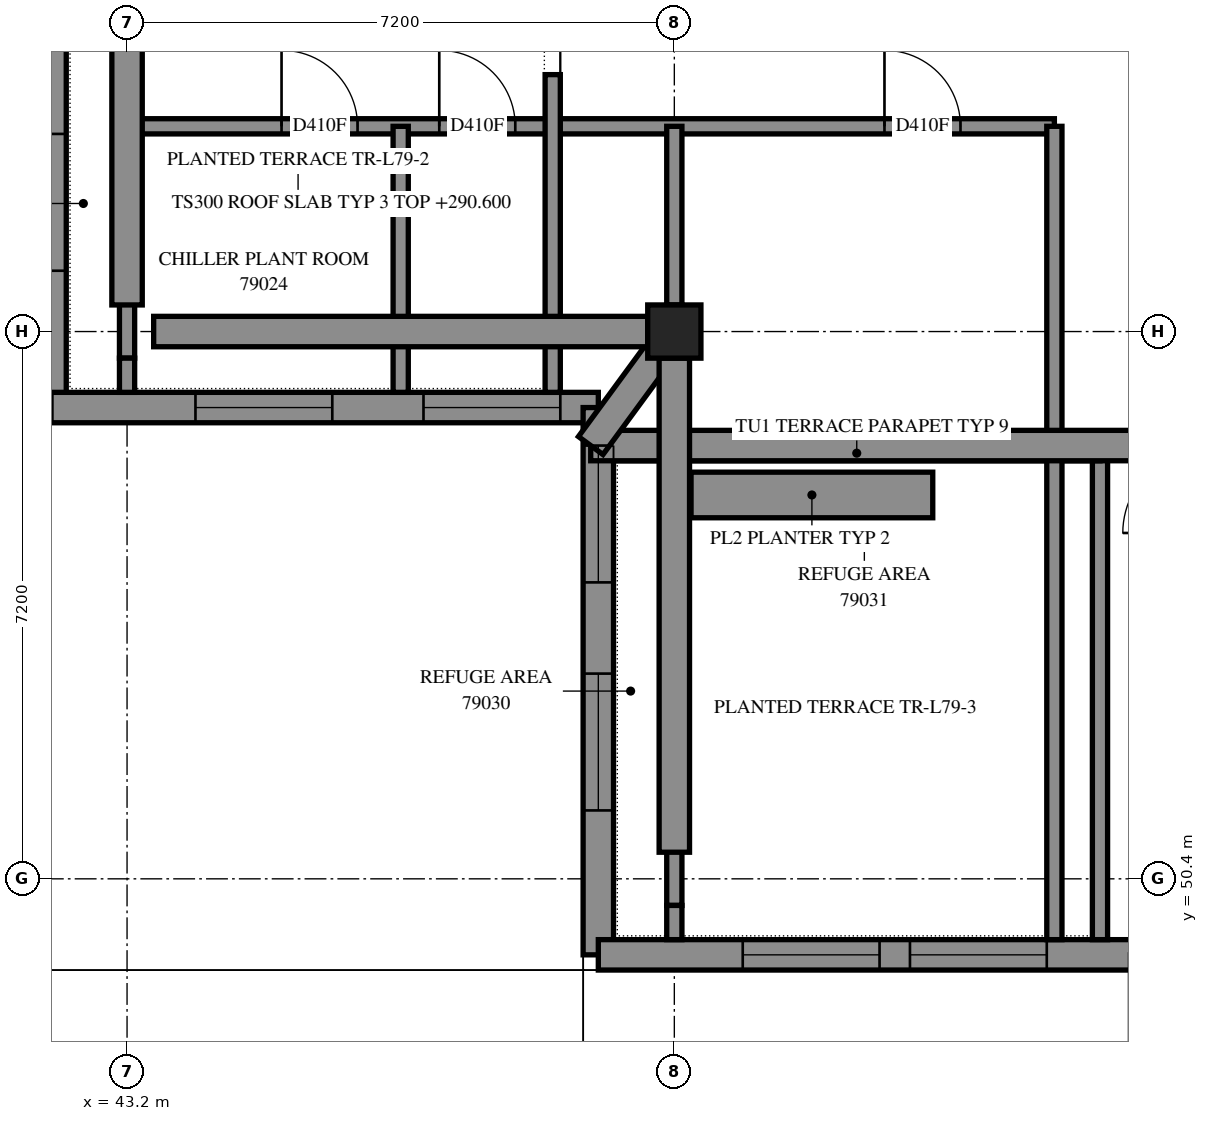
"""IFC4 building model, lengths in metres.
Left out: names, types, materials, properties, quantities, classifications, styles, units other than length and angle.
Written with IfcOpenShell. Run it as: python <this file> out.ifc"""

import sys

from ifc_helpers import new_model, si_unit, direction, frame, frame_2d, origin, origin_2d, place, context, subcontext, project, spatial, polyline, rectangle, outline, extrude, element, fill, save


model = new_model("IFC4")
c1 = context("Model", 3, precision=1e-05, world=origin(), true_north=direction((0.0, 1.0)))
c2 = subcontext(c1, "Body", "Model", "MODEL_VIEW")
j1 = project(units=[si_unit("LENGTHUNIT", "METRE"), si_unit("PLANEANGLEUNIT", "RADIAN")], contexts=[c1])
p1 = place(None, origin())
s1 = spatial("IfcSite", under=j1, at=p1, CompositionType="ELEMENT")
p2 = place(p1, origin())
s2 = spatial("IfcBuilding", under=s1, at=p2, CompositionType="ELEMENT")
p3 = place(p2, frame((0.0, 0.0, 290.6)))
s3 = spatial("IfcBuildingStorey", under=s2, at=p3, CompositionType="ELEMENT", Elevation=290.6)
p4 = place(p3, frame((50.4, 57.6, 0.0), z_axis=(0.0, 0.0, 1.0), x_axis=(1.0, 0.0, 0.0)))
e1 = element("IfcColumn", 1, at=p4, inside=s3, PredefinedType="COLUMN", context=c2, shape_type="SweptSolid", body=[
    extrude(rectangle(XDim=0.7, YDim=0.7, at=origin_2d()), origin(), (0.0, 0.0, 1.0), 3.5),
])
p5 = place(p3, frame((42.2, 63.8, 0.0), z_axis=(0.0, 0.0, 1.0), x_axis=(0.0, -1.0, 0.0)))
e2 = element("IfcWall", 2, at=p5, inside=s3, PredefinedType="SOLIDWALL", context=c2, shape_type="SweptSolid", body=[
    extrude(outline(polyline([(0.2, -0.2), (7.4, -0.2), (7.0, 0.2), (-0.2, 0.2), (0.2, -0.2)])), origin(), (0.0, 0.0, 1.0), 3.5),
])
p6 = place(p5, frame((3.6, 0.0, 0.7)))
e3 = element("IfcOpeningElement", 3, at=p6, cuts=e2, PredefinedType="OPENING", context=c2, shape_type="SweptSolid", body=[
    extrude(rectangle(XDim=1.8, YDim=2.2, at=frame_2d((0.9, 1.1))), frame((0.0, 0.21, 0.0), z_axis=(0.0, -1.0, 0.0), x_axis=(1.0, 0.0, 0.0)), (0.0, 0.0, 1.0), 0.42),
])
p7 = place(p3, frame((42.2, 56.6, 0.0), z_axis=(0.0, 0.0, 1.0), x_axis=(1.0, 0.0, 0.0)))
e4 = element("IfcWall", 4, at=p7, inside=s3, PredefinedType="SOLIDWALL", context=c2, shape_type="SweptSolid", body=[
    extrude(outline(polyline([(-0.2, -0.2), (7.0, -0.2), (7.4, 0.2), (0.2, 0.2), (-0.2, -0.2)])), origin(), (0.0, 0.0, 1.0), 3.5),
])
p8 = place(p7, frame((1.9, 0.0, 0.7)))
e5 = element("IfcOpeningElement", 5, at=p8, cuts=e4, PredefinedType="OPENING", context=c2, shape_type="SweptSolid", body=[
    extrude(rectangle(XDim=1.8, YDim=2.2, at=frame_2d((0.9, 1.1))), frame((0.0, 0.21, 0.0), z_axis=(0.0, -1.0, 0.0), x_axis=(1.0, 0.0, 0.0)), (0.0, 0.0, 1.0), 0.42),
])
p9 = place(p7, frame((4.9, 0.0, 0.7)))
e6 = element("IfcOpeningElement", 6, at=p9, cuts=e4, PredefinedType="OPENING", context=c2, shape_type="SweptSolid", body=[
    extrude(rectangle(XDim=1.8, YDim=2.2, at=frame_2d((0.9, 1.1))), frame((0.0, 0.21, 0.0), z_axis=(0.0, -1.0, 0.0), x_axis=(1.0, 0.0, 0.0)), (0.0, 0.0, 1.0), 0.42),
])
p10 = place(p3, frame((49.4, 56.6, 0.0), z_axis=(0.0, 0.0, 1.0), x_axis=(0.0, -1.0, 0.0)))
e7 = element("IfcWall", 7, at=p10, inside=s3, PredefinedType="SOLIDWALL", context=c2, shape_type="SweptSolid", body=[
    extrude(outline(polyline([(0.2, -0.2), (7.4, -0.2), (7.0, 0.2), (-0.2, 0.2), (0.2, -0.2)])), origin(), (0.0, 0.0, 1.0), 3.5),
])
p11 = place(p10, frame((0.5, 0.0, 0.7)))
e8 = element("IfcOpeningElement", 8, at=p11, cuts=e7, PredefinedType="OPENING", context=c2, shape_type="SweptSolid", body=[
    extrude(rectangle(XDim=1.8, YDim=2.2, at=frame_2d((0.9, 1.1))), frame((0.0, 0.21, 0.0), z_axis=(0.0, -1.0, 0.0), x_axis=(1.0, 0.0, 0.0)), (0.0, 0.0, 1.0), 0.42),
])
p12 = place(p10, frame((3.5, 0.0, 0.7)))
e9 = element("IfcOpeningElement", 9, at=p12, cuts=e7, PredefinedType="OPENING", context=c2, shape_type="SweptSolid", body=[
    extrude(rectangle(XDim=1.8, YDim=2.2, at=frame_2d((0.9, 1.1))), frame((0.0, 0.21, 0.0), z_axis=(0.0, -1.0, 0.0), x_axis=(1.0, 0.0, 0.0)), (0.0, 0.0, 1.0), 0.42),
])
p13 = place(p3, frame((49.4, 49.4, 0.0), z_axis=(0.0, 0.0, 1.0), x_axis=(1.0, 0.0, 0.0)))
e10 = element("IfcWall", 10, at=p13, inside=s3, PredefinedType="SOLIDWALL", context=c2, shape_type="SweptSolid", body=[
    extrude(outline(polyline([(-0.2, -0.2), (7.0, -0.2), (7.4, 0.2), (0.2, 0.2), (-0.2, -0.2)])), origin(), (0.0, 0.0, 1.0), 3.5),
])
p14 = place(p13, frame((1.9, 0.0, 0.7)))
e11 = element("IfcOpeningElement", 11, at=p14, cuts=e10, PredefinedType="OPENING", context=c2, shape_type="SweptSolid", body=[
    extrude(rectangle(XDim=1.8, YDim=2.2, at=frame_2d((0.9, 1.1))), frame((0.0, 0.21, 0.0), z_axis=(0.0, -1.0, 0.0), x_axis=(1.0, 0.0, 0.0)), (0.0, 0.0, 1.0), 0.42),
])
p15 = place(p13, frame((4.1, 0.0, 0.7)))
e12 = element("IfcOpeningElement", 12, at=p15, cuts=e10, PredefinedType="OPENING", context=c2, shape_type="SweptSolid", body=[
    extrude(rectangle(XDim=1.8, YDim=2.2, at=frame_2d((0.9, 1.1))), frame((0.0, 0.21, 0.0), z_axis=(0.0, -1.0, 0.0), x_axis=(1.0, 0.0, 0.0)), (0.0, 0.0, 1.0), 0.42),
])
p16 = place(p3, frame((56.0, 49.6, 0.0), z_axis=(0.0, 0.0, 1.0), x_axis=(0.0, 1.0, 0.0)))
e13 = element("IfcWall", 13, at=p16, inside=s3, PredefinedType="PARAPET", context=c2, shape_type="SweptSolid", body=[
    extrude(outline(polyline([(0.0, -0.1), (6.5, -0.1), (6.3, 0.1), (0.0, 0.1), (0.0, -0.1)])), origin(), (0.0, 0.0, 1.0), 0.25),
])
p17 = place(p3, frame((56.0, 56.0, 0.0), z_axis=(0.0, 0.0, 1.0), x_axis=(-1.0, 0.0, 0.0)))
e14 = element("IfcWall", 14, at=p17, inside=s3, PredefinedType="PARAPET", context=c2, shape_type="SweptSolid", body=[
    extrude(outline(polyline([(-0.1, -0.1), (6.4, -0.1), (6.4, 0.1), (0.1, 0.1), (-0.1, -0.1)])), origin(), (0.0, 0.0, 1.0), 0.25),
])
p18 = place(p3, frame((43.2, 60.3, 0.0), z_axis=(0.0, 0.0, 1.0), x_axis=(1.0, 0.0, 0.0)))
e15 = element("IfcWall", 15, at=p18, inside=s3, PredefinedType="PARTITIONING", context=c2, shape_type="SweptSolid", body=[
    extrude(rectangle(XDim=12.2, YDim=0.2, at=frame_2d((6.1, 0.0))), origin(), (0.0, 0.0, 1.0), 3.5),
])
p19 = place(p18, frame((2.033, 0.0, 0.0)))
e16 = element("IfcOpeningElement", 16, at=p19, cuts=e15, PredefinedType="OPENING", context=c2, shape_type="SweptSolid", body=[
    extrude(rectangle(XDim=1.0, YDim=2.1, at=frame_2d((0.5, 1.05))), frame((0.0, 0.11, 0.0), z_axis=(0.0, -1.0, 0.0), x_axis=(1.0, 0.0, 0.0)), (0.0, 0.0, 1.0), 0.22),
])
p20 = place(p18, frame((4.107, 0.0, 0.0)))
e17 = element("IfcOpeningElement", 17, at=p20, cuts=e15, PredefinedType="OPENING", context=c2, shape_type="SweptSolid", body=[
    extrude(rectangle(XDim=1.0, YDim=2.1, at=frame_2d((0.5, 1.05))), frame((0.0, 0.11, 0.0), z_axis=(0.0, -1.0, 0.0), x_axis=(1.0, 0.0, 0.0)), (0.0, 0.0, 1.0), 0.22),
])
p21 = place(p18, frame((9.965, 0.0, 0.0)))
e18 = element("IfcOpeningElement", 18, at=p21, cuts=e15, PredefinedType="OPENING", context=c2, shape_type="SweptSolid", body=[
    extrude(rectangle(XDim=1.0, YDim=2.1, at=frame_2d((0.5, 1.05))), frame((0.0, 0.11, 0.0), z_axis=(0.0, -1.0, 0.0), x_axis=(1.0, 0.0, 0.0)), (0.0, 0.0, 1.0), 0.22),
])
p22 = place(p3, frame((55.4, 49.6, 0.0), z_axis=(0.0, 0.0, 1.0), x_axis=(0.0, 1.0, 0.0)))
e19 = element("IfcWall", 19, at=p22, inside=s3, PredefinedType="PARTITIONING", context=c2, shape_type="SweptSolid", body=[
    extrude(rectangle(XDim=10.7, YDim=0.2, at=frame_2d((5.35, 0.0))), origin(), (0.0, 0.0, 1.0), 3.5),
])
p23 = place(p3, frame((50.4, 50.05, 0.0), z_axis=(0.0, 0.0, 1.0), x_axis=(0.0, 1.0, 0.0)))
e20 = element("IfcWall", 20, at=p23, inside=s3, PredefinedType="PARTITIONING", context=c2, shape_type="SweptSolid", body=[
    extrude(rectangle(XDim=7.9, YDim=0.2, at=frame_2d((3.95, 0.0))), origin(), (0.0, 0.0, 1.0), 3.5),
])
p24 = place(p3, frame((43.2, 57.25, 0.0), z_axis=(0.0, 0.0, 1.0), x_axis=(0.0, 1.0, 0.0)))
e21 = element("IfcWall", 21, at=p24, inside=s3, PredefinedType="PARTITIONING", context=c2, shape_type="SweptSolid", body=[
    extrude(rectangle(XDim=3.05, YDim=0.2, at=frame_2d((1.525, 0.0))), origin(), (0.0, 0.0, 1.0), 3.5),
])
p25 = place(p3, frame((50.4, 57.95, 0.0), z_axis=(0.0, 0.0, 1.0), x_axis=(0.0, 1.0, 0.0)))
e22 = element("IfcWall", 22, at=p25, inside=s3, PredefinedType="PARTITIONING", context=c2, shape_type="SweptSolid", body=[
    extrude(rectangle(XDim=2.35, YDim=0.2, at=frame_2d((1.175, 0.0))), origin(), (0.0, 0.0, 1.0), 3.0),
])
p26 = place(p3, frame((43.2, 60.3, 0.0), z_axis=(0.0, 0.0, 1.0), x_axis=(0.0, 1.0, 0.0)))
e23 = element("IfcWall", 23, at=p26, inside=s3, PredefinedType="PARTITIONING", context=c2, shape_type="SweptSolid", body=[
    extrude(rectangle(XDim=1.8, YDim=0.2, at=frame_2d((0.9, 0.0))), origin(), (0.0, 0.0, 1.0), 3.5),
])
p27 = place(p3, frame((48.8, 56.8, 0.0), z_axis=(0.0, 0.0, 1.0), x_axis=(0.0, 1.0, 0.0)))
e24 = element("IfcWall", 24, at=p27, inside=s3, PredefinedType="PARAPET", context=c2, shape_type="SweptSolid", body=[
    extrude(outline(polyline([(0.0, -0.1), (4.18, -0.1), (4.18, 0.1), (0.0, 0.1), (0.0, -0.1)])), origin(), (0.0, 0.0, 1.0), 0.25),
])
p28 = place(p3, frame((53.8, 55.45, 0.0), z_axis=(0.0, 0.0, 1.0), x_axis=(-1.0, 0.0, 0.0)))
e25 = element("IfcWall", 25, at=p28, inside=s3, PredefinedType="SOLIDWALL", context=c2, shape_type="SweptSolid", body=[
    extrude(outline(polyline([(0.0, -0.3), (3.18, -0.3), (3.18, 0.3), (0.0, 0.3), (0.0, -0.3)])), origin(), (0.0, 0.0, 1.0), 0.65),
])
p29 = place(p3, frame((46.8, 56.8, 0.0), z_axis=(0.0, 0.0, 1.0), x_axis=(0.0, 1.0, 0.0)))
e26 = element("IfcWall", 26, at=p29, inside=s3, PredefinedType="PARTITIONING", context=c2, shape_type="SweptSolid", body=[
    extrude(outline(polyline([(0.0, -0.1), (3.5, -0.1), (3.5, 0.1), (0.0, 0.1), (0.0, -0.1)])), origin(), (0.0, 0.0, 1.0), 3.5),
])
for number, where, z_axis, x_axis in (
    (27, (43.2, 56.8, 0.0), (0.0, 0.0, 1.0), (0.0, 1.0, 0.0)),
    (28, (50.4, 49.6, 0.0), (0.0, 0.0, 1.0), (0.0, 1.0, 0.0)),
):
    element("IfcWall", number, at=place(p3, frame(where, z_axis=z_axis, x_axis=x_axis)), inside=s3, PredefinedType="PARTITIONING", context=c2, shape_type="SweptSolid", body=[
        extrude(outline(polyline([(0.0, -0.1), (0.45, -0.1), (0.45, 0.1), (0.0, 0.1), (0.0, -0.1)])), origin(), (0.0, 0.0, 1.0), 3.5),
    ])
p30 = place(p6, origin())
e29 = element("IfcWindow", 29, at=p30, inside=s3, PartitioningType="SINGLE_PANEL", PredefinedType="WINDOW", context=c2, shape_type="SweptSolid", body=[
    extrude(rectangle(XDim=1.8, YDim=2.2, at=frame_2d((0.9, 1.1))), frame((0.0, 0.08, 0.0), z_axis=(0.0, -1.0, 0.0), x_axis=(1.0, 0.0, 0.0)), (0.0, 0.0, 1.0), 0.06),
])
fill(e3, e29)
p31 = place(p8, origin())
e30 = element("IfcWindow", 30, at=p31, inside=s3, PartitioningType="SINGLE_PANEL", PredefinedType="WINDOW", context=c2, shape_type="SweptSolid", body=[
    extrude(rectangle(XDim=1.8, YDim=2.2, at=frame_2d((0.9, 1.1))), frame((0.0, 0.08, 0.0), z_axis=(0.0, -1.0, 0.0), x_axis=(1.0, 0.0, 0.0)), (0.0, 0.0, 1.0), 0.06),
])
fill(e5, e30)
p32 = place(p9, origin())
e31 = element("IfcWindow", 31, at=p32, inside=s3, PartitioningType="SINGLE_PANEL", PredefinedType="WINDOW", context=c2, shape_type="SweptSolid", body=[
    extrude(rectangle(XDim=1.8, YDim=2.2, at=frame_2d((0.9, 1.1))), frame((0.0, 0.08, 0.0), z_axis=(0.0, -1.0, 0.0), x_axis=(1.0, 0.0, 0.0)), (0.0, 0.0, 1.0), 0.06),
])
fill(e6, e31)
p33 = place(p11, origin())
e32 = element("IfcWindow", 32, at=p33, inside=s3, PartitioningType="SINGLE_PANEL", PredefinedType="WINDOW", context=c2, shape_type="SweptSolid", body=[
    extrude(rectangle(XDim=1.8, YDim=2.2, at=frame_2d((0.9, 1.1))), frame((0.0, 0.08, 0.0), z_axis=(0.0, -1.0, 0.0), x_axis=(1.0, 0.0, 0.0)), (0.0, 0.0, 1.0), 0.06),
])
fill(e8, e32)
p34 = place(p12, origin())
e33 = element("IfcWindow", 33, at=p34, inside=s3, PartitioningType="SINGLE_PANEL", PredefinedType="WINDOW", context=c2, shape_type="SweptSolid", body=[
    extrude(rectangle(XDim=1.8, YDim=2.2, at=frame_2d((0.9, 1.1))), frame((0.0, 0.08, 0.0), z_axis=(0.0, -1.0, 0.0), x_axis=(1.0, 0.0, 0.0)), (0.0, 0.0, 1.0), 0.06),
])
fill(e9, e33)
p35 = place(p14, origin())
e34 = element("IfcWindow", 34, at=p35, inside=s3, PartitioningType="SINGLE_PANEL", PredefinedType="WINDOW", context=c2, shape_type="SweptSolid", body=[
    extrude(rectangle(XDim=1.8, YDim=2.2, at=frame_2d((0.9, 1.1))), frame((0.0, 0.08, 0.0), z_axis=(0.0, -1.0, 0.0), x_axis=(1.0, 0.0, 0.0)), (0.0, 0.0, 1.0), 0.06),
])
fill(e11, e34)
p36 = place(p15, origin())
e35 = element("IfcWindow", 35, at=p36, inside=s3, PartitioningType="SINGLE_PANEL", PredefinedType="WINDOW", context=c2, shape_type="SweptSolid", body=[
    extrude(rectangle(XDim=1.8, YDim=2.2, at=frame_2d((0.9, 1.1))), frame((0.0, 0.08, 0.0), z_axis=(0.0, -1.0, 0.0), x_axis=(1.0, 0.0, 0.0)), (0.0, 0.0, 1.0), 0.06),
])
fill(e12, e35)
p37 = place(p19, origin())
e36 = element("IfcDoor", 36, at=p37, inside=s3, OperationType="SINGLE_SWING_LEFT", PredefinedType="DOOR", context=c2, shape_type="SweptSolid", body=[
    extrude(rectangle(XDim=1.0, YDim=2.1, at=frame_2d((0.5, 1.05))), frame((0.0, 0.025, 0.0), z_axis=(0.0, -1.0, 0.0), x_axis=(1.0, 0.0, 0.0)), (0.0, 0.0, 1.0), 0.05),
])
fill(e16, e36)
p38 = place(p20, origin())
e37 = element("IfcDoor", 37, at=p38, inside=s3, OperationType="SINGLE_SWING_RIGHT", PredefinedType="DOOR", context=c2, shape_type="SweptSolid", body=[
    extrude(rectangle(XDim=1.0, YDim=2.1, at=frame_2d((0.5, 1.05))), frame((0.0, 0.025, 0.0), z_axis=(0.0, -1.0, 0.0), x_axis=(1.0, 0.0, 0.0)), (0.0, 0.0, 1.0), 0.05),
])
fill(e17, e37)
p39 = place(p21, origin())
e38 = element("IfcDoor", 38, at=p39, inside=s3, OperationType="SINGLE_SWING_LEFT", PredefinedType="DOOR", context=c2, shape_type="SweptSolid", body=[
    extrude(rectangle(XDim=1.0, YDim=2.1, at=frame_2d((0.5, 1.05))), frame((0.0, 0.025, 0.0), z_axis=(0.0, -1.0, 0.0), x_axis=(1.0, 0.0, 0.0)), (0.0, 0.0, 1.0), 0.05),
])
fill(e18, e38)
save(model, sys.argv[1])
